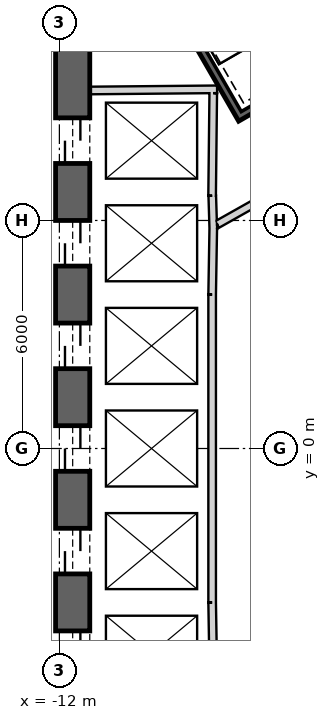
"""IFC4 building model, lengths in metres.
Left out: names, types, materials, properties, quantities, classifications, styles, units other than length and angle.
Written with IfcOpenShell. Run it as: python <this file> out.ifc"""

import sys

from ifc_helpers import new_model, si_unit, direction, frame, frame_2d, origin, place, context, subcontext, project, spatial, rectangle, extrude, element, fill, save


model = new_model("IFC4")
c1 = context("Model", 3, precision=1e-05, world=origin(), true_north=direction((0.0, 1.0)))
c2 = subcontext(c1, "Body", "Model", "MODEL_VIEW")
j1 = project(units=[si_unit("LENGTHUNIT", "METRE"), si_unit("PLANEANGLEUNIT", "RADIAN")], contexts=[c1])
p1 = place(None, origin())
s1 = spatial("IfcSite", under=j1, at=p1, CompositionType="ELEMENT")
p2 = place(p1, origin())
s2 = spatial("IfcBuilding", under=s1, at=p2, CompositionType="ELEMENT")
p3 = place(p2, frame((0.0, 0.0, 33.5)))
s3 = spatial("IfcBuildingStorey", under=s2, at=p3, CompositionType="ELEMENT", Elevation=33.5)
p4 = place(p3, frame((19.475, 2.208, 0.0), z_axis=(0.0, 0.0, 1.0), x_axis=(-0.866028369851, 0.499994862586, 0.0)))
e1 = element("IfcWall", 1, at=p4, inside=s3, PredefinedType="SHEAR", context=c2, shape_type="SweptSolid", body=[
    extrude(rectangle(XDim=31.523, YDim=0.9, at=frame_2d((15.762, 0.0))), origin(), (0.0, 0.0, 1.0), 6.0),
])
p5 = place(p4, frame((7.062, 0.0, 0.0)))
e2 = element("IfcOpeningElement", 2, at=p5, cuts=e1, PredefinedType="OPENING", context=c2, shape_type="SweptSolid", body=[
    extrude(rectangle(XDim=1.2, YDim=2.4, at=frame_2d((0.6, 1.2))), frame((0.0, 0.46, 0.0), z_axis=(0.0, -1.0, 0.0), x_axis=(1.0, 0.0, 0.0)), (0.0, 0.0, 1.0), 0.92),
])
p6 = place(p4, frame((9.762, 0.0, 0.0)))
e3 = element("IfcOpeningElement", 3, at=p6, cuts=e1, PredefinedType="OPENING", context=c2, shape_type="SweptSolid", body=[
    extrude(rectangle(XDim=1.2, YDim=2.4, at=frame_2d((0.6, 1.2))), frame((0.0, 0.46, 0.0), z_axis=(0.0, -1.0, 0.0), x_axis=(1.0, 0.0, 0.0)), (0.0, 0.0, 1.0), 0.92),
])
p7 = place(p4, frame((12.462, 0.0, 0.0)))
e4 = element("IfcOpeningElement", 4, at=p7, cuts=e1, PredefinedType="OPENING", context=c2, shape_type="SweptSolid", body=[
    extrude(rectangle(XDim=1.2, YDim=2.4, at=frame_2d((0.6, 1.2))), frame((0.0, 0.46, 0.0), z_axis=(0.0, -1.0, 0.0), x_axis=(1.0, 0.0, 0.0)), (0.0, 0.0, 1.0), 0.92),
])
p8 = place(p4, frame((15.162, 0.0, 0.0)))
e5 = element("IfcOpeningElement", 5, at=p8, cuts=e1, PredefinedType="OPENING", context=c2, shape_type="SweptSolid", body=[
    extrude(rectangle(XDim=1.2, YDim=2.4, at=frame_2d((0.6, 1.2))), frame((0.0, 0.46, 0.0), z_axis=(0.0, -1.0, 0.0), x_axis=(1.0, 0.0, 0.0)), (0.0, 0.0, 1.0), 0.92),
])
p9 = place(p4, frame((17.862, 0.0, 0.0)))
e6 = element("IfcOpeningElement", 6, at=p9, cuts=e1, PredefinedType="OPENING", context=c2, shape_type="SweptSolid", body=[
    extrude(rectangle(XDim=1.2, YDim=2.4, at=frame_2d((0.6, 1.2))), frame((0.0, 0.46, 0.0), z_axis=(0.0, -1.0, 0.0), x_axis=(1.0, 0.0, 0.0)), (0.0, 0.0, 1.0), 0.92),
])
p10 = place(p4, frame((20.562, 0.0, 0.0)))
e7 = element("IfcOpeningElement", 7, at=p10, cuts=e1, PredefinedType="OPENING", context=c2, shape_type="SweptSolid", body=[
    extrude(rectangle(XDim=1.2, YDim=2.4, at=frame_2d((0.6, 1.2))), frame((0.0, 0.46, 0.0), z_axis=(0.0, -1.0, 0.0), x_axis=(1.0, 0.0, 0.0)), (0.0, 0.0, 1.0), 0.92),
])
p11 = place(p4, frame((23.262, 0.0, 0.0)))
e8 = element("IfcOpeningElement", 8, at=p11, cuts=e1, PredefinedType="OPENING", context=c2, shape_type="SweptSolid", body=[
    extrude(rectangle(XDim=1.2, YDim=2.4, at=frame_2d((0.6, 1.2))), frame((0.0, 0.46, 0.0), z_axis=(0.0, -1.0, 0.0), x_axis=(1.0, 0.0, 0.0)), (0.0, 0.0, 1.0), 0.92),
])
p12 = place(p4, frame((3.612, 0.0, 0.0)))
e9 = element("IfcOpeningElement", 9, at=p12, cuts=e1, PredefinedType="OPENING", context=c2, shape_type="SweptSolid", body=[
    extrude(rectangle(XDim=1.2, YDim=2.4, at=frame_2d((0.6, 1.2))), frame((0.0, 0.46, 0.0), z_axis=(0.0, -1.0, 0.0), x_axis=(1.0, 0.0, 0.0)), (0.0, 0.0, 1.0), 0.92),
])
p13 = place(p4, frame((26.712, 0.0, 0.0)))
e10 = element("IfcOpeningElement", 10, at=p13, cuts=e1, PredefinedType="OPENING", context=c2, shape_type="SweptSolid", body=[
    extrude(rectangle(XDim=1.2, YDim=2.4, at=frame_2d((0.6, 1.2))), frame((0.0, 0.46, 0.0), z_axis=(0.0, -1.0, 0.0), x_axis=(1.0, 0.0, 0.0)), (0.0, 0.0, 1.0), 0.92),
])
p14 = place(p3, frame((-11.65, 15.762, 0.0), z_axis=(0.0, 0.0, 1.0), x_axis=(0.0, -1.0, 0.0)))
e11 = element("IfcWall", 11, at=p14, inside=s3, PredefinedType="SHEAR", context=c2, shape_type="SweptSolid", body=[
    extrude(rectangle(XDim=31.523, YDim=0.9, at=frame_2d((15.762, 0.0))), origin(), (0.0, 0.0, 1.0), 6.0),
])
p15 = place(p14, frame((7.062, 0.0, 0.0)))
e12 = element("IfcOpeningElement", 12, at=p15, cuts=e11, PredefinedType="OPENING", context=c2, shape_type="SweptSolid", body=[
    extrude(rectangle(XDim=1.2, YDim=2.4, at=frame_2d((0.6, 1.2))), frame((0.0, 0.46, 0.0), z_axis=(0.0, -1.0, 0.0), x_axis=(1.0, 0.0, 0.0)), (0.0, 0.0, 1.0), 0.92),
])
p16 = place(p14, frame((9.762, 0.0, 0.0)))
e13 = element("IfcOpeningElement", 13, at=p16, cuts=e11, PredefinedType="OPENING", context=c2, shape_type="SweptSolid", body=[
    extrude(rectangle(XDim=1.2, YDim=2.4, at=frame_2d((0.6, 1.2))), frame((0.0, 0.46, 0.0), z_axis=(0.0, -1.0, 0.0), x_axis=(1.0, 0.0, 0.0)), (0.0, 0.0, 1.0), 0.92),
])
p17 = place(p14, frame((12.462, 0.0, 0.0)))
e14 = element("IfcOpeningElement", 14, at=p17, cuts=e11, PredefinedType="OPENING", context=c2, shape_type="SweptSolid", body=[
    extrude(rectangle(XDim=1.2, YDim=2.4, at=frame_2d((0.6, 1.2))), frame((0.0, 0.46, 0.0), z_axis=(0.0, -1.0, 0.0), x_axis=(1.0, 0.0, 0.0)), (0.0, 0.0, 1.0), 0.92),
])
p18 = place(p14, frame((15.162, 0.0, 0.0)))
e15 = element("IfcOpeningElement", 15, at=p18, cuts=e11, PredefinedType="OPENING", context=c2, shape_type="SweptSolid", body=[
    extrude(rectangle(XDim=1.2, YDim=2.4, at=frame_2d((0.6, 1.2))), frame((0.0, 0.46, 0.0), z_axis=(0.0, -1.0, 0.0), x_axis=(1.0, 0.0, 0.0)), (0.0, 0.0, 1.0), 0.92),
])
p19 = place(p14, frame((17.862, 0.0, 0.0)))
e16 = element("IfcOpeningElement", 16, at=p19, cuts=e11, PredefinedType="OPENING", context=c2, shape_type="SweptSolid", body=[
    extrude(rectangle(XDim=1.2, YDim=2.4, at=frame_2d((0.6, 1.2))), frame((0.0, 0.46, 0.0), z_axis=(0.0, -1.0, 0.0), x_axis=(1.0, 0.0, 0.0)), (0.0, 0.0, 1.0), 0.92),
])
p20 = place(p14, frame((20.562, 0.0, 0.0)))
e17 = element("IfcOpeningElement", 17, at=p20, cuts=e11, PredefinedType="OPENING", context=c2, shape_type="SweptSolid", body=[
    extrude(rectangle(XDim=1.2, YDim=2.4, at=frame_2d((0.6, 1.2))), frame((0.0, 0.46, 0.0), z_axis=(0.0, -1.0, 0.0), x_axis=(1.0, 0.0, 0.0)), (0.0, 0.0, 1.0), 0.92),
])
p21 = place(p14, frame((23.262, 0.0, 0.0)))
e18 = element("IfcOpeningElement", 18, at=p21, cuts=e11, PredefinedType="OPENING", context=c2, shape_type="SweptSolid", body=[
    extrude(rectangle(XDim=1.2, YDim=2.4, at=frame_2d((0.6, 1.2))), frame((0.0, 0.46, 0.0), z_axis=(0.0, -1.0, 0.0), x_axis=(1.0, 0.0, 0.0)), (0.0, 0.0, 1.0), 0.92),
])
p22 = place(p14, frame((3.612, 0.0, 0.0)))
e19 = element("IfcOpeningElement", 19, at=p22, cuts=e11, PredefinedType="OPENING", context=c2, shape_type="SweptSolid", body=[
    extrude(rectangle(XDim=1.2, YDim=2.4, at=frame_2d((0.6, 1.2))), frame((0.0, 0.46, 0.0), z_axis=(0.0, -1.0, 0.0), x_axis=(1.0, 0.0, 0.0)), (0.0, 0.0, 1.0), 0.92),
])
p23 = place(p14, frame((26.712, 0.0, 0.0)))
e20 = element("IfcOpeningElement", 20, at=p23, cuts=e11, PredefinedType="OPENING", context=c2, shape_type="SweptSolid", body=[
    extrude(rectangle(XDim=1.2, YDim=2.4, at=frame_2d((0.6, 1.2))), frame((0.0, 0.46, 0.0), z_axis=(0.0, -1.0, 0.0), x_axis=(1.0, 0.0, 0.0)), (0.0, 0.0, 1.0), 0.92),
])
p24 = place(p3, frame((-7.825, -17.97, 0.0), z_axis=(0.0, 0.0, 1.0), x_axis=(0.866028369851, 0.499994862586, 0.0)))
e21 = element("IfcWall", 21, at=p24, inside=s3, PredefinedType="SHEAR", context=c2, shape_type="SweptSolid", body=[
    extrude(rectangle(XDim=31.523, YDim=0.9, at=frame_2d((15.762, 0.0))), origin(), (0.0, 0.0, 1.0), 6.0),
])
p25 = place(p24, frame((7.062, 0.0, 0.0)))
e22 = element("IfcOpeningElement", 22, at=p25, cuts=e21, PredefinedType="OPENING", context=c2, shape_type="SweptSolid", body=[
    extrude(rectangle(XDim=1.2, YDim=2.4, at=frame_2d((0.6, 1.2))), frame((0.0, 0.46, 0.0), z_axis=(0.0, -1.0, 0.0), x_axis=(1.0, 0.0, 0.0)), (0.0, 0.0, 1.0), 0.92),
])
p26 = place(p24, frame((9.762, 0.0, 0.0)))
e23 = element("IfcOpeningElement", 23, at=p26, cuts=e21, PredefinedType="OPENING", context=c2, shape_type="SweptSolid", body=[
    extrude(rectangle(XDim=1.2, YDim=2.4, at=frame_2d((0.6, 1.2))), frame((0.0, 0.46, 0.0), z_axis=(0.0, -1.0, 0.0), x_axis=(1.0, 0.0, 0.0)), (0.0, 0.0, 1.0), 0.92),
])
p27 = place(p24, frame((12.462, 0.0, 0.0)))
e24 = element("IfcOpeningElement", 24, at=p27, cuts=e21, PredefinedType="OPENING", context=c2, shape_type="SweptSolid", body=[
    extrude(rectangle(XDim=1.2, YDim=2.4, at=frame_2d((0.6, 1.2))), frame((0.0, 0.46, 0.0), z_axis=(0.0, -1.0, 0.0), x_axis=(1.0, 0.0, 0.0)), (0.0, 0.0, 1.0), 0.92),
])
p28 = place(p24, frame((15.162, 0.0, 0.0)))
e25 = element("IfcOpeningElement", 25, at=p28, cuts=e21, PredefinedType="OPENING", context=c2, shape_type="SweptSolid", body=[
    extrude(rectangle(XDim=1.2, YDim=2.4, at=frame_2d((0.6, 1.2))), frame((0.0, 0.46, 0.0), z_axis=(0.0, -1.0, 0.0), x_axis=(1.0, 0.0, 0.0)), (0.0, 0.0, 1.0), 0.92),
])
p29 = place(p24, frame((17.862, 0.0, 0.0)))
e26 = element("IfcOpeningElement", 26, at=p29, cuts=e21, PredefinedType="OPENING", context=c2, shape_type="SweptSolid", body=[
    extrude(rectangle(XDim=1.2, YDim=2.4, at=frame_2d((0.6, 1.2))), frame((0.0, 0.46, 0.0), z_axis=(0.0, -1.0, 0.0), x_axis=(1.0, 0.0, 0.0)), (0.0, 0.0, 1.0), 0.92),
])
p30 = place(p24, frame((20.562, 0.0, 0.0)))
e27 = element("IfcOpeningElement", 27, at=p30, cuts=e21, PredefinedType="OPENING", context=c2, shape_type="SweptSolid", body=[
    extrude(rectangle(XDim=1.2, YDim=2.4, at=frame_2d((0.6, 1.2))), frame((0.0, 0.46, 0.0), z_axis=(0.0, -1.0, 0.0), x_axis=(1.0, 0.0, 0.0)), (0.0, 0.0, 1.0), 0.92),
])
p31 = place(p24, frame((26.712, 0.0, 0.0)))
e28 = element("IfcOpeningElement", 28, at=p31, cuts=e21, PredefinedType="OPENING", context=c2, shape_type="SweptSolid", body=[
    extrude(rectangle(XDim=1.2, YDim=2.4, at=frame_2d((0.6, 1.2))), frame((0.0, 0.46, 0.0), z_axis=(0.0, -1.0, 0.0), x_axis=(1.0, 0.0, 0.0)), (0.0, 0.0, 1.0), 0.92),
])
p32 = place(p24, frame((3.612, 0.0, 0.0)))
e29 = element("IfcOpeningElement", 29, at=p32, cuts=e21, PredefinedType="OPENING", context=c2, shape_type="SweptSolid", body=[
    extrude(rectangle(XDim=1.2, YDim=2.4, at=frame_2d((0.6, 1.2))), frame((0.0, 0.46, 0.0), z_axis=(0.0, -1.0, 0.0), x_axis=(1.0, 0.0, 0.0)), (0.0, 0.0, 1.0), 0.92),
])
p33 = place(p3, frame((-11.2, 9.42, 0.0), z_axis=(0.0, 0.0, 1.0), x_axis=(0.999957167047, 0.009255488683, 0.0)))
e30 = element("IfcWall", 30, at=p33, inside=s3, PredefinedType="PLUMBINGWALL", context=c2, shape_type="SweptSolid", body=[
    extrude(rectangle(XDim=3.35, YDim=0.2, at=frame_2d((1.675, 0.0))), origin(), (0.0, 0.0, 1.0), 5.65),
])
p34 = place(p3, frame((-7.951, 9.35, 0.0), z_axis=(0.0, 0.0, 1.0), x_axis=(-0.011120469654, -0.999938165666, 0.0)))
e31 = element("IfcWall", 31, at=p34, inside=s3, PredefinedType="PLUMBINGWALL", context=c2, shape_type="SweptSolid", body=[
    extrude(rectangle(XDim=2.7, YDim=0.2, at=frame_2d((1.35, 0.0))), origin(), (0.0, 0.0, 1.0), 5.65),
])
p35 = place(p3, frame((-7.977, 6.65, 0.0), z_axis=(0.0, 0.0, 1.0), x_axis=(0.030861509705, -0.999523670164, 0.0)))
e32 = element("IfcWall", 32, at=p35, inside=s3, PredefinedType="PLUMBINGWALL", context=c2, shape_type="SweptSolid", body=[
    extrude(rectangle(XDim=0.878, YDim=0.2, at=frame_2d((0.439, 0.0))), origin(), (0.0, 0.0, 1.0), 5.65),
])
p36 = place(p3, frame((-7.949, 5.894, 0.0), z_axis=(0.0, 0.0, 1.0), x_axis=(-0.016809909365, -0.999858703491, 0.0)))
e33 = element("IfcWall", 33, at=p36, inside=s3, PredefinedType="PLUMBINGWALL", context=c2, shape_type="SweptSolid", body=[
    extrude(rectangle(XDim=1.844, YDim=0.2, at=frame_2d((0.922, 0.0))), origin(), (0.0, 0.0, 1.0), 5.65),
])
p37 = place(p3, frame((-7.98, 4.05, 0.0), z_axis=(0.0, 0.0, 1.0), x_axis=(0.0, -1.0, 0.0)))
e34 = element("IfcWall", 34, at=p37, inside=s3, PredefinedType="PLUMBINGWALL", context=c2, shape_type="SweptSolid", body=[
    extrude(rectangle(XDim=8.1, YDim=0.2, at=frame_2d((4.05, 0.0))), origin(), (0.0, 0.0, 1.0), 5.65),
])
p38 = place(p3, frame((-7.98, -4.05, 0.0), z_axis=(0.0, 0.0, 1.0), x_axis=(0.016809909365, -0.999858703491, 0.0)))
e35 = element("IfcWall", 35, at=p38, inside=s3, PredefinedType="PLUMBINGWALL", context=c2, shape_type="SweptSolid", body=[
    extrude(rectangle(XDim=1.844, YDim=0.2, at=frame_2d((0.922, 0.0))), origin(), (0.0, 0.0, 1.0), 5.65),
])
p39 = place(p3, frame((-11.245, 15.678, -0.3), z_axis=(0.0, 0.0, 1.0), x_axis=(0.499977274689, -0.866038523851, 0.0)))
e36 = element("IfcWall", 36, at=p39, inside=s3, PredefinedType="SHEAR", context=c2, shape_type="SweptSolid", body=[
    extrude(rectangle(XDim=8.1, YDim=0.2, at=frame_2d((4.05, 0.0))), origin(), (0.0, 0.0, 1.0), 5.95),
])
p40 = place(p3, frame((-7.159, 8.8, -0.3), z_axis=(0.0, 0.0, 1.0), x_axis=(0.866047807691, 0.499961193289, 0.0)))
e37 = element("IfcWall", 37, at=p40, inside=s3, PredefinedType="SHEAR", context=c2, shape_type="SweptSolid", body=[
    extrude(rectangle(XDim=3.6, YDim=0.2, at=frame_2d((1.8, 0.0))), origin(), (0.0, 0.0, 1.0), 5.95),
])
p41 = place(p40, frame((1.25, 0.0, 0.3)))
e38 = element("IfcOpeningElement", 38, at=p41, cuts=e37, PredefinedType="OPENING", context=c2, shape_type="SweptSolid", body=[
    extrude(rectangle(XDim=1.1, YDim=2.1, at=frame_2d((0.55, 1.05))), frame((0.0, 0.11, 0.0), z_axis=(0.0, -1.0, 0.0), x_axis=(1.0, 0.0, 0.0)), (0.0, 0.0, 1.0), 0.22),
])
p42 = place(p3, frame((-5.6, 7.16, 0.0), z_axis=(0.0, 0.0, 1.0), x_axis=(-0.871340486379, -0.490678873396, 0.0)))
e39 = element("IfcWall", 39, at=p42, inside=s3, PredefinedType="PARTITIONING", context=c2, shape_type="SweptSolid", body=[
    extrude(rectangle(XDim=2.581, YDim=0.2, at=frame_2d((1.291, 0.0))), origin(), (0.0, 0.0, 1.0), 5.65),
])
p43 = place(p15, origin())
e40 = element("IfcDoor", 40, at=p43, inside=s3, OperationType="SLIDING_TO_LEFT", PredefinedType="USERDEFINED", context=c2, shape_type="SweptSolid", body=[
    extrude(rectangle(XDim=1.2, YDim=2.4, at=frame_2d((0.6, 1.2))), frame((0.0, 0.025, 0.0), z_axis=(0.0, -1.0, 0.0), x_axis=(1.0, 0.0, 0.0)), (0.0, 0.0, 1.0), 0.05),
])
fill(e12, e40)
p44 = place(p16, origin())
e41 = element("IfcDoor", 41, at=p44, inside=s3, OperationType="SLIDING_TO_LEFT", PredefinedType="USERDEFINED", context=c2, shape_type="SweptSolid", body=[
    extrude(rectangle(XDim=1.2, YDim=2.4, at=frame_2d((0.6, 1.2))), frame((0.0, 0.025, 0.0), z_axis=(0.0, -1.0, 0.0), x_axis=(1.0, 0.0, 0.0)), (0.0, 0.0, 1.0), 0.05),
])
fill(e13, e41)
p45 = place(p17, origin())
e42 = element("IfcDoor", 42, at=p45, inside=s3, OperationType="SLIDING_TO_LEFT", PredefinedType="USERDEFINED", context=c2, shape_type="SweptSolid", body=[
    extrude(rectangle(XDim=1.2, YDim=2.4, at=frame_2d((0.6, 1.2))), frame((0.0, 0.025, 0.0), z_axis=(0.0, -1.0, 0.0), x_axis=(1.0, 0.0, 0.0)), (0.0, 0.0, 1.0), 0.05),
])
fill(e14, e42)
p46 = place(p18, origin())
e43 = element("IfcDoor", 43, at=p46, inside=s3, OperationType="SLIDING_TO_LEFT", PredefinedType="USERDEFINED", context=c2, shape_type="SweptSolid", body=[
    extrude(rectangle(XDim=1.2, YDim=2.4, at=frame_2d((0.6, 1.2))), frame((0.0, 0.025, 0.0), z_axis=(0.0, -1.0, 0.0), x_axis=(1.0, 0.0, 0.0)), (0.0, 0.0, 1.0), 0.05),
])
fill(e15, e43)
p47 = place(p19, origin())
e44 = element("IfcDoor", 44, at=p47, inside=s3, OperationType="SLIDING_TO_LEFT", PredefinedType="USERDEFINED", context=c2, shape_type="SweptSolid", body=[
    extrude(rectangle(XDim=1.2, YDim=2.4, at=frame_2d((0.6, 1.2))), frame((0.0, 0.025, 0.0), z_axis=(0.0, -1.0, 0.0), x_axis=(1.0, 0.0, 0.0)), (0.0, 0.0, 1.0), 0.05),
])
fill(e16, e44)
p48 = place(p20, origin())
e45 = element("IfcDoor", 45, at=p48, inside=s3, OperationType="SLIDING_TO_LEFT", PredefinedType="USERDEFINED", context=c2, shape_type="SweptSolid", body=[
    extrude(rectangle(XDim=1.2, YDim=2.4, at=frame_2d((0.6, 1.2))), frame((0.0, 0.025, 0.0), z_axis=(0.0, -1.0, 0.0), x_axis=(1.0, 0.0, 0.0)), (0.0, 0.0, 1.0), 0.05),
])
fill(e17, e45)
save(model, sys.argv[1])
